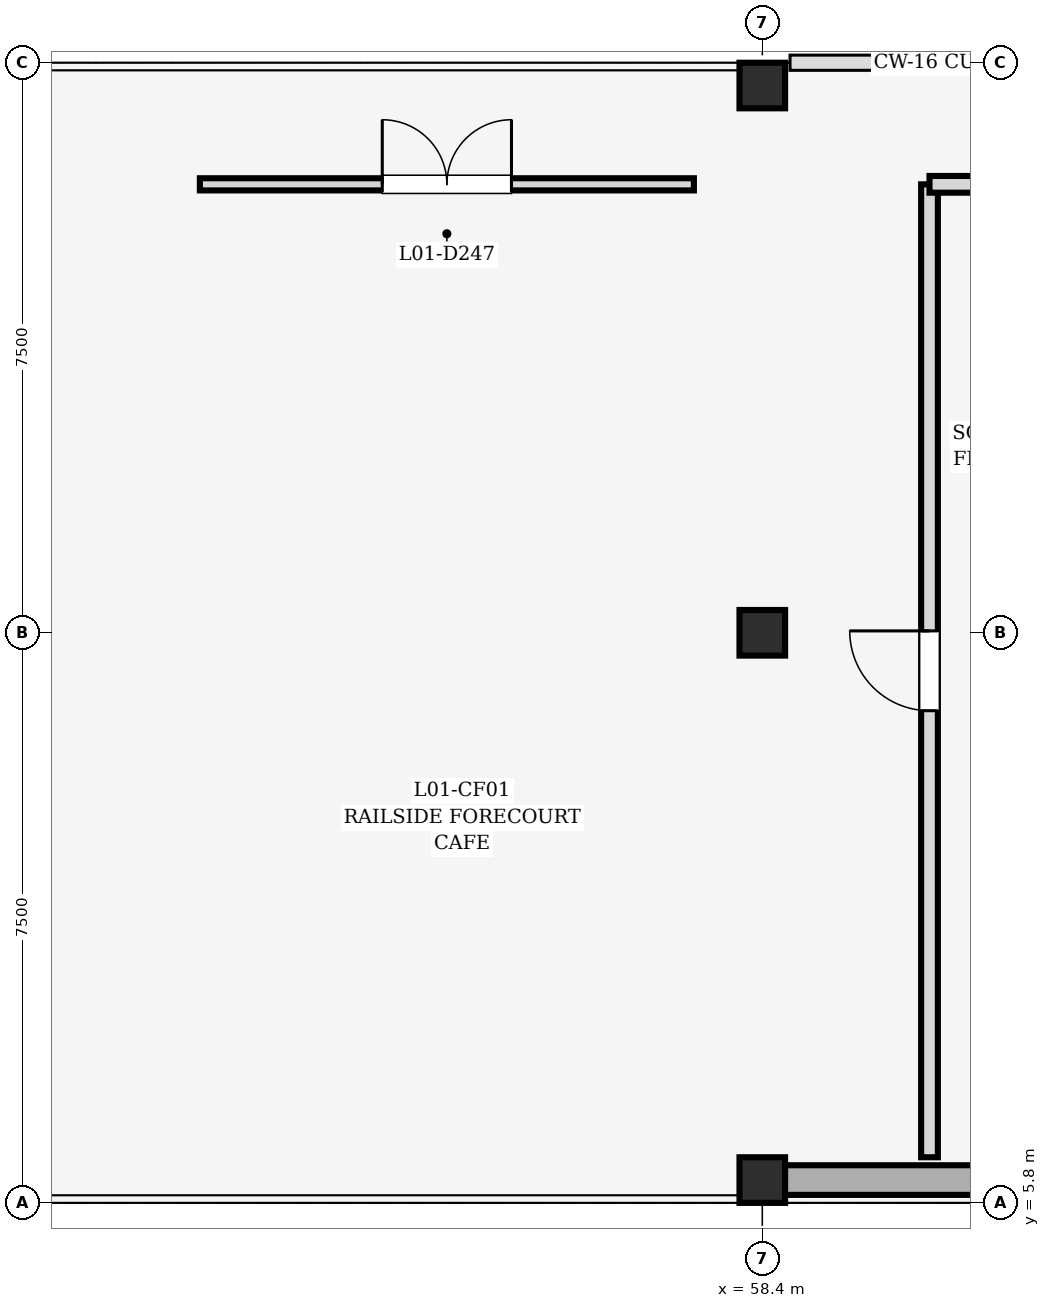
"""IFC4 building model, lengths in metres.
Left out: names, types, materials, properties, quantities, classifications, styles, units other than length and angle.
Written with IfcOpenShell. Run it as: python <this file> out.ifc"""

import sys

from ifc_helpers import new_model, si_unit, direction, frame, frame_2d, origin, origin_2d, place, context, subcontext, project, spatial, rectangle, extrude, element, fill, save


model = new_model("IFC4")
c1 = context("Model", 3, precision=1e-05, world=origin(), true_north=direction((0.0, 1.0)))
c2 = subcontext(c1, "Body", "Model", "MODEL_VIEW")
j1 = project(units=[si_unit("LENGTHUNIT", "METRE"), si_unit("PLANEANGLEUNIT", "RADIAN")], contexts=[c1])
p1 = place(None, origin())
s1 = spatial("IfcSite", under=j1, at=p1, CompositionType="ELEMENT")
p2 = place(p1, origin())
s2 = spatial("IfcBuilding", under=s1, at=p2, CompositionType="ELEMENT")
p3 = place(p2, origin())
s3 = spatial("IfcBuildingStorey", under=s2, at=p3, CompositionType="ELEMENT", Elevation=0.0)
for number, where, z_axis, x_axis in (
    (1, (58.4, 6.1, 0.0), (0.0, 0.0, 1.0), (1.0, 0.0, 0.0)),
    (2, (58.4, 13.3, 0.0), (0.0, 0.0, 1.0), (1.0, 0.0, 0.0)),
    (3, (58.4, 20.5, 0.0), (0.0, 0.0, 1.0), (1.0, 0.0, 0.0)),
):
    element("IfcColumn", number, at=place(p3, frame(where, z_axis=z_axis, x_axis=x_axis)), inside=s3, PredefinedType="COLUMN", context=c2, shape_type="SweptSolid", body=[
        extrude(rectangle(XDim=0.6, YDim=0.6, at=origin_2d()), origin(), (0.0, 0.0, 1.0), 5.4),
    ])
p4 = place(p3, frame((67.715, 6.1, 0.0), z_axis=(0.0, 0.0, 1.0), x_axis=(-1.0, 0.0, 0.0)))
e4 = element("IfcWall", 4, at=p4, inside=s3, PredefinedType="STANDARD", context=c2, shape_type="SweptSolid", body=[
    extrude(rectangle(XDim=9.03, YDim=0.39, at=frame_2d((4.515, 0.0))), origin(), (0.0, 0.0, 1.0), 4.427),
])
p5 = place(p4, frame((3.395, 0.0, 0.0)))
e5 = element("IfcOpeningElement", 5, at=p5, cuts=e4, PredefinedType="OPENING", context=c2, shape_type="SweptSolid", body=[
    extrude(rectangle(XDim=2.24, YDim=2.35, at=frame_2d((1.12, 1.175))), frame((0.0, 0.207, 0.0), z_axis=(0.0, -1.0, 0.0), x_axis=(1.0, 0.0, 0.0)), (0.0, 0.0, 1.0), 0.414),
])
p6 = place(p3, frame((60.6, 6.4, 0.0), z_axis=(0.0, 0.0, 1.0), x_axis=(0.0, 1.0, 0.0)))
e6 = element("IfcWall", 6, at=p6, inside=s3, PredefinedType="SOLIDWALL", context=c2, shape_type="SweptSolid", body=[
    extrude(rectangle(XDim=12.8, YDim=0.22, at=frame_2d((6.4, 0.0))), origin(), (0.0, 0.0, 1.0), 5.125),
])
p7 = place(p6, frame((5.875, 0.0, 0.0)))
e7 = element("IfcOpeningElement", 7, at=p7, cuts=e6, PredefinedType="OPENING", context=c2, shape_type="SweptSolid", body=[
    extrude(rectangle(XDim=1.05, YDim=2.15, at=frame_2d((0.525, 1.075))), frame((0.0, 0.122, 0.0), z_axis=(0.0, -1.0, 0.0), x_axis=(1.0, 0.0, 0.0)), (0.0, 0.0, 1.0), 0.244),
])
p8 = place(p3, frame((60.6, 19.2, 0.0), z_axis=(0.0, 0.0, 1.0), x_axis=(1.0, 0.0, 0.0)))
e8 = element("IfcWall", 8, at=p8, inside=s3, PredefinedType="SOLIDWALL", context=c2, shape_type="SweptSolid", body=[
    extrude(rectangle(XDim=7.7, YDim=0.22, at=frame_2d((3.85, 0.0))), origin(), (0.0, 0.0, 1.0), 5.125),
])
p9 = place(p8, frame((3.325, 0.0, 0.0)))
e9 = element("IfcOpeningElement", 9, at=p9, cuts=e8, PredefinedType="OPENING", context=c2, shape_type="SweptSolid", body=[
    extrude(rectangle(XDim=1.05, YDim=2.15, at=frame_2d((0.525, 1.075))), frame((0.0, 0.122, 0.0), z_axis=(0.0, -1.0, 0.0), x_axis=(1.0, 0.0, 0.0)), (0.0, 0.0, 1.0), 0.244),
])
p10 = place(p3, frame((51.0, 19.2, 0.0), z_axis=(0.0, 0.0, 1.0), x_axis=(1.0, 0.0, 0.0)))
e10 = element("IfcWall", 10, at=p10, inside=s3, PredefinedType="PARTITIONING", context=c2, shape_type="SweptSolid", body=[
    extrude(rectangle(XDim=6.5, YDim=0.16, at=frame_2d((3.25, 0.0))), origin(), (0.0, 0.0, 1.0), 5.125),
])
p11 = place(p10, frame((2.4, 0.0, 0.0)))
e11 = element("IfcOpeningElement", 11, at=p11, cuts=e10, PredefinedType="OPENING", context=c2, shape_type="SweptSolid", body=[
    extrude(rectangle(XDim=1.7, YDim=2.2, at=frame_2d((0.85, 1.1))), frame((0.0, 0.092, 0.0), z_axis=(0.0, -1.0, 0.0), x_axis=(1.0, 0.0, 0.0)), (0.0, 0.0, 1.0), 0.184),
])
p12 = place(p7, origin())
e12 = element("IfcDoor", 12, at=p12, inside=s3, OperationType="SINGLE_SWING_RIGHT", PredefinedType="DOOR", context=c2, shape_type="SweptSolid", body=[
    extrude(rectangle(XDim=1.05, YDim=2.15, at=frame_2d((0.525, 1.075))), frame((0.0, 0.025, 0.0), z_axis=(0.0, -1.0, 0.0), x_axis=(1.0, 0.0, 0.0)), (0.0, 0.0, 1.0), 0.05),
])
fill(e7, e12)
p13 = place(p11, origin())
e13 = element("IfcDoor", 13, at=p13, inside=s3, OperationType="DOUBLE_DOOR_SINGLE_SWING", PredefinedType="DOOR", context=c2, shape_type="SweptSolid", body=[
    extrude(rectangle(XDim=1.7, YDim=2.2, at=frame_2d((0.85, 1.1))), frame((0.0, 0.025, 0.0), z_axis=(0.0, -1.0, 0.0), x_axis=(1.0, 0.0, 0.0)), (0.0, 0.0, 1.0), 0.05),
])
fill(e11, e13)
save(model, sys.argv[1])
